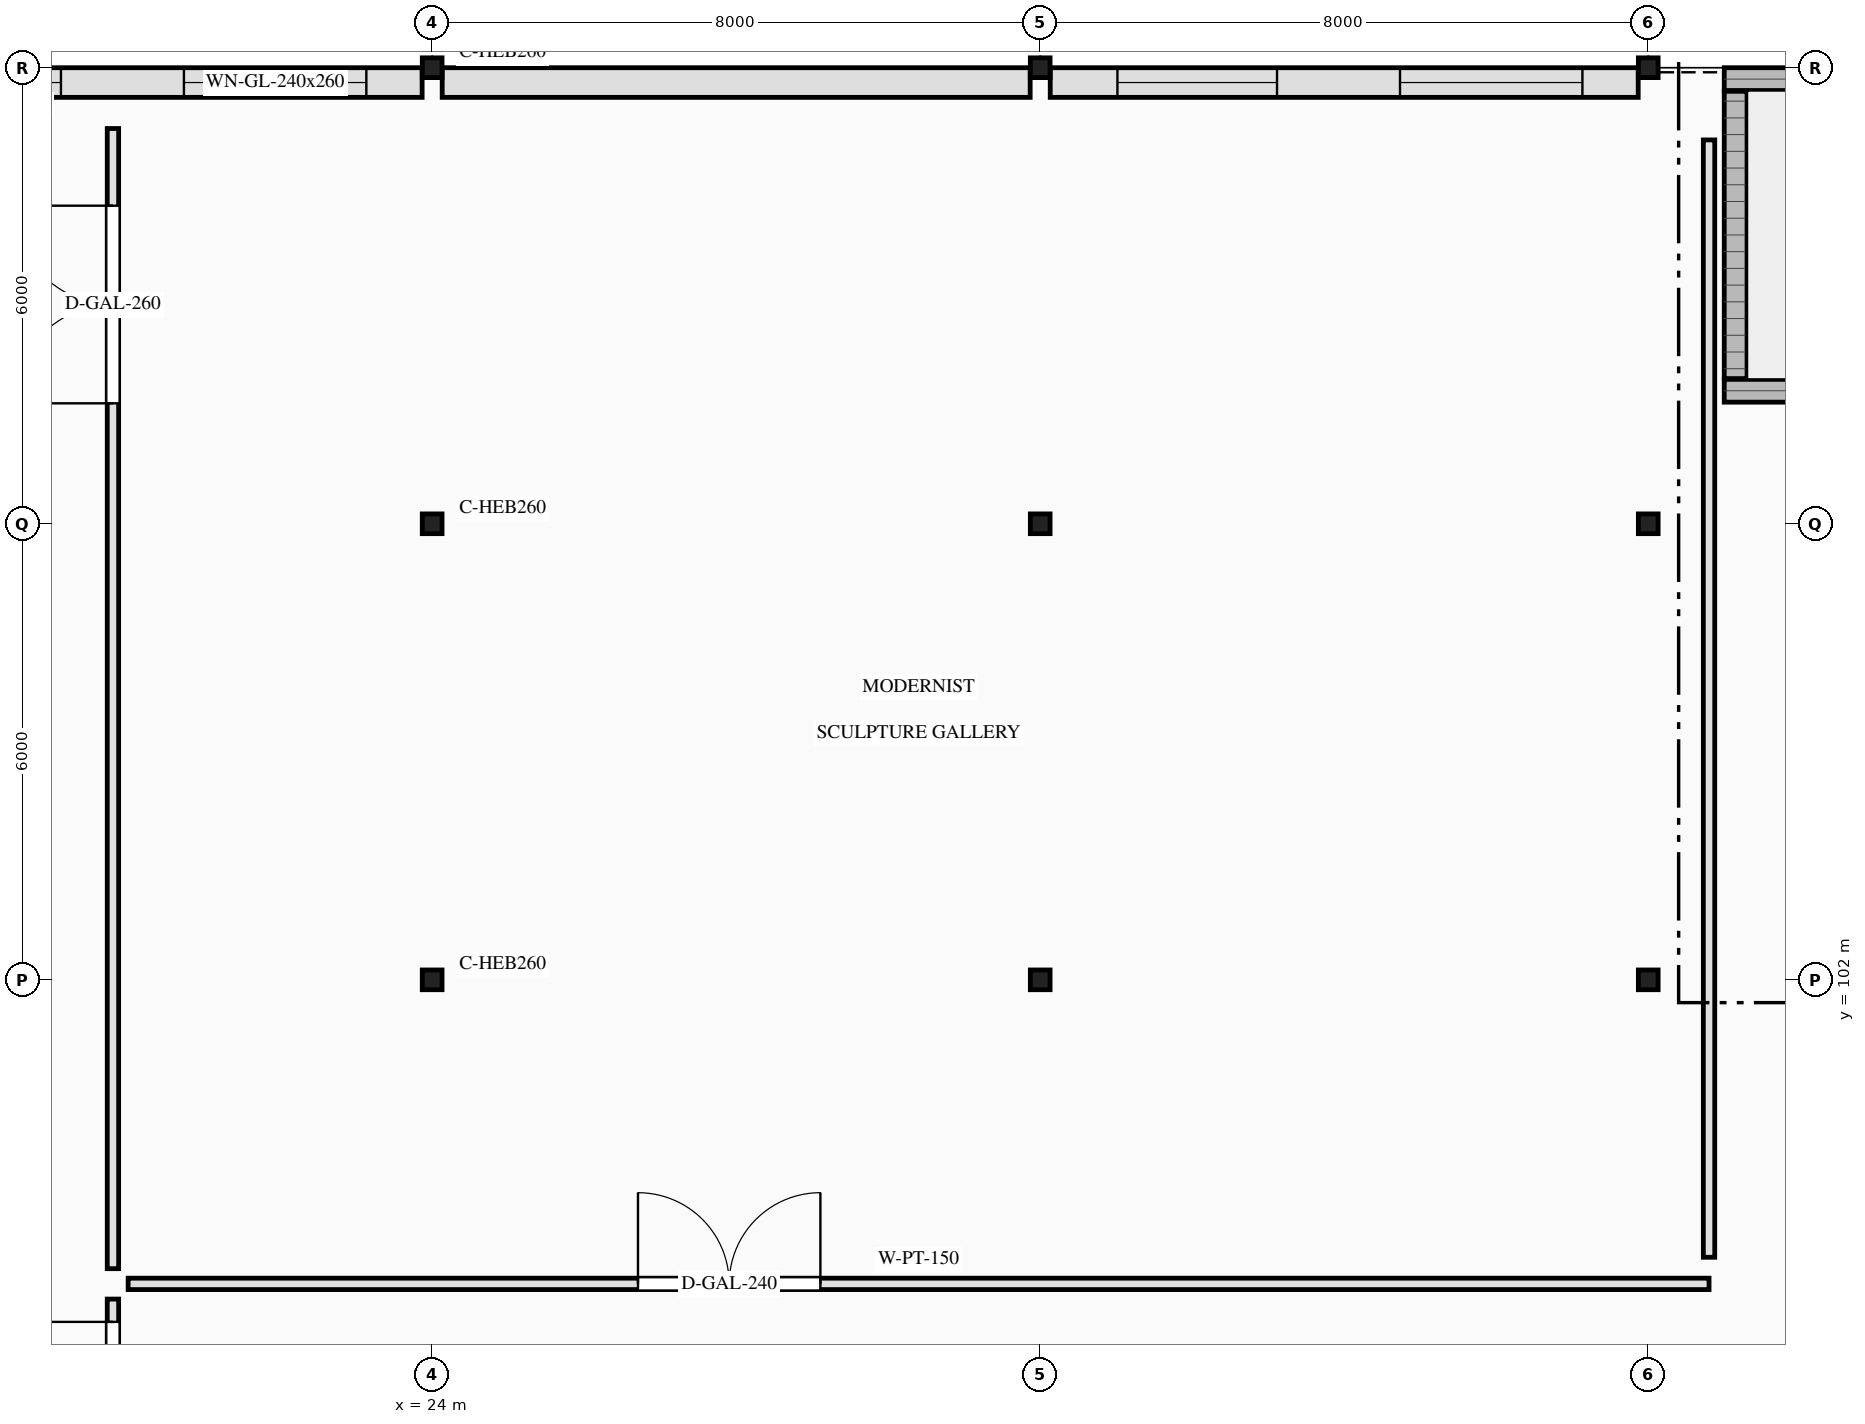
"""IFC4 building model, lengths in metres.
Left out: names, types, materials, properties, quantities, classifications, styles, units other than length and angle.
Written with IfcOpenShell. Run it as: python <this file> out.ifc"""

import sys

from ifc_helpers import new_model, si_unit, direction, frame, frame_2d, origin, origin_2d, place, context, subcontext, project, spatial, rectangle, i_section, extrude, element, fill, save


model = new_model("IFC4")
c1 = context("Model", 3, precision=1e-05, world=origin(), true_north=direction((0.0, 1.0)))
c2 = subcontext(c1, "Body", "Model", "MODEL_VIEW")
j1 = project(units=[si_unit("LENGTHUNIT", "METRE"), si_unit("PLANEANGLEUNIT", "RADIAN")], contexts=[c1])
p1 = place(None, origin())
s1 = spatial("IfcSite", under=j1, at=p1, CompositionType="ELEMENT")
p2 = place(p1, origin())
s2 = spatial("IfcBuilding", under=s1, at=p2, CompositionType="ELEMENT")
p3 = place(p2, frame((0.0, 0.0, 9.6)))
s3 = spatial("IfcBuildingStorey", under=s2, at=p3, CompositionType="ELEMENT", Elevation=9.6)
for number, where, z_axis, x_axis in (
    (1, (41.0, 109.75, 0.0), (0.0, 0.0, 1.0), (1.0, 0.0, 0.0)),
    (2, (41.0, 113.85, 0.0), (0.0, 0.0, 1.0), (1.0, 0.0, 0.0)),
):
    element("IfcWall", number, at=place(p3, frame(where, z_axis=z_axis, x_axis=x_axis)), inside=s3, PredefinedType="SHEAR", context=c2, shape_type="SweptSolid", body=[
        extrude(rectangle(XDim=10.0, YDim=0.3, at=frame_2d((5.0, 0.0))), origin(), (0.0, 0.0, 1.0), 8.0),
    ])
p4 = place(p3, frame((41.15, 109.91, 0.0), z_axis=(0.0, 0.0, 1.0), x_axis=(0.0, 1.0, 0.0)))
e3 = element("IfcWall", 3, at=p4, inside=s3, PredefinedType="SHEAR", context=c2, shape_type="SweptSolid", body=[
    extrude(rectangle(XDim=3.78, YDim=0.3, at=frame_2d((1.89, 0.0))), origin(), (0.0, 0.0, 1.0), 8.0),
])
for number, where, z_axis, x_axis in (
    (4, (24.0, 102.0, 0.0), (0.0, 0.0, 1.0), (1.0, 0.0, 0.0)),
    (5, (24.0, 108.0, 0.0), (0.0, 0.0, 1.0), (1.0, 0.0, 0.0)),
    (6, (24.0, 114.0, 0.0), (0.0, 0.0, 1.0), (1.0, 0.0, 0.0)),
    (7, (32.0, 102.0, 0.0), (0.0, 0.0, 1.0), (1.0, 0.0, 0.0)),
    (8, (32.0, 108.0, 0.0), (0.0, 0.0, 1.0), (1.0, 0.0, 0.0)),
    (9, (32.0, 114.0, 0.0), (0.0, 0.0, 1.0), (1.0, 0.0, 0.0)),
    (10, (40.0, 102.0, 0.0), (0.0, 0.0, 1.0), (1.0, 0.0, 0.0)),
    (11, (40.0, 108.0, 0.0), (0.0, 0.0, 1.0), (1.0, 0.0, 0.0)),
    (12, (40.0, 114.0, 0.0), (0.0, 0.0, 1.0), (1.0, 0.0, 0.0)),
):
    element("IfcColumn", number, at=place(p3, frame(where, z_axis=z_axis, x_axis=x_axis)), inside=s3, PredefinedType="COLUMN", context=c2, shape_type="SweptSolid", body=[
        extrude(i_section(OverallWidth=0.26, OverallDepth=0.26, WebThickness=0.01, FlangeThickness=0.018, FilletRadius=0.024, at=origin_2d()), origin(), (0.0, 0.0, 1.0), 8.0),
    ])
p5 = place(p3, frame((16.132, 113.805, 0.0), z_axis=(0.0, 0.0, 1.0), x_axis=(1.0, 0.0, 0.0)))
e13 = element("IfcWall", 13, at=p5, inside=s3, PredefinedType="SOLIDWALL", context=c2, shape_type="SweptSolid", body=[
    extrude(rectangle(XDim=7.736, YDim=0.39, at=frame_2d((3.868, 0.0))), origin(), (0.0, 0.0, 1.0), 7.305),
])
p6 = place(p5, frame((0.884, 0.0, 0.85)))
e14 = element("IfcOpeningElement", 14, at=p6, cuts=e13, PredefinedType="OPENING", context=c2, shape_type="SweptSolid", body=[
    extrude(rectangle(XDim=2.1, YDim=2.5, at=frame_2d((1.05, 1.25))), frame((0.0, 0.205, 0.0), z_axis=(0.0, -1.0, 0.0), x_axis=(1.0, 0.0, 0.0)), (0.0, 0.0, 1.0), 0.41),
])
p7 = place(p5, frame((4.602, 0.0, 0.85)))
e15 = element("IfcOpeningElement", 15, at=p7, cuts=e13, PredefinedType="OPENING", context=c2, shape_type="SweptSolid", body=[
    extrude(rectangle(XDim=2.4, YDim=2.6, at=frame_2d((1.2, 1.3))), frame((0.0, 0.205, 0.0), z_axis=(0.0, -1.0, 0.0), x_axis=(1.0, 0.0, 0.0)), (0.0, 0.0, 1.0), 0.41),
])
p8 = place(p3, frame((24.132, 113.805, 0.0), z_axis=(0.0, 0.0, 1.0), x_axis=(1.0, 0.0, 0.0)))
e16 = element("IfcWall", 16, at=p8, inside=s3, PredefinedType="SOLIDWALL", context=c2, shape_type="SweptSolid", body=[
    extrude(rectangle(XDim=7.736, YDim=0.39, at=frame_2d((3.868, 0.0))), origin(), (0.0, 0.0, 1.0), 7.305),
])
p9 = place(p3, frame((32.132, 113.805, 0.0), z_axis=(0.0, 0.0, 1.0), x_axis=(1.0, 0.0, 0.0)))
e17 = element("IfcWall", 17, at=p9, inside=s3, PredefinedType="SOLIDWALL", context=c2, shape_type="SweptSolid", body=[
    extrude(rectangle(XDim=7.736, YDim=0.39, at=frame_2d((3.868, 0.0))), origin(), (0.0, 0.0, 1.0), 7.305),
])
p10 = place(p9, frame((0.884, 0.0, 0.85)))
e18 = element("IfcOpeningElement", 18, at=p10, cuts=e17, PredefinedType="OPENING", context=c2, shape_type="SweptSolid", body=[
    extrude(rectangle(XDim=2.1, YDim=2.5, at=frame_2d((1.05, 1.25))), frame((0.0, 0.205, 0.0), z_axis=(0.0, -1.0, 0.0), x_axis=(1.0, 0.0, 0.0)), (0.0, 0.0, 1.0), 0.41),
])
p11 = place(p9, frame((4.602, 0.0, 0.85)))
e19 = element("IfcOpeningElement", 19, at=p11, cuts=e17, PredefinedType="OPENING", context=c2, shape_type="SweptSolid", body=[
    extrude(rectangle(XDim=2.4, YDim=2.6, at=frame_2d((1.2, 1.3))), frame((0.0, 0.205, 0.0), z_axis=(0.0, -1.0, 0.0), x_axis=(1.0, 0.0, 0.0)), (0.0, 0.0, 1.0), 0.41),
])
p12 = place(p3, frame((19.8, 94.2, 0.0), z_axis=(0.0, 0.0, 1.0), x_axis=(0.0, 1.0, 0.0)))
e20 = element("IfcWall", 20, at=p12, inside=s3, PredefinedType="PARTITIONING", context=c2, shape_type="SweptSolid", body=[
    extrude(rectangle(XDim=3.6, YDim=0.15, at=frame_2d((1.8, 0.0))), origin(), (0.0, 0.0, 1.0), 7.76),
])
p13 = place(p12, frame((0.7, 0.0, 0.0)))
e21 = element("IfcOpeningElement", 21, at=p13, cuts=e20, PredefinedType="OPENING", context=c2, shape_type="SweptSolid", body=[
    extrude(rectangle(XDim=2.6, YDim=2.9, at=frame_2d((1.3, 1.45))), frame((0.0, 0.085, 0.0), z_axis=(0.0, -1.0, 0.0), x_axis=(1.0, 0.0, 0.0)), (0.0, 0.0, 1.0), 0.17),
])
p14 = place(p3, frame((20.0, 98.0, 0.0), z_axis=(0.0, 0.0, 1.0), x_axis=(1.0, 0.0, 0.0)))
e22 = element("IfcWall", 22, at=p14, inside=s3, PredefinedType="PARTITIONING", context=c2, shape_type="SweptSolid", body=[
    extrude(rectangle(XDim=20.8, YDim=0.15, at=frame_2d((10.4, 0.0))), origin(), (0.0, 0.0, 1.0), 7.76),
])
p15 = place(p14, frame((6.708, 0.0, 0.0)))
e23 = element("IfcOpeningElement", 23, at=p15, cuts=e22, PredefinedType="OPENING", context=c2, shape_type="SweptSolid", body=[
    extrude(rectangle(XDim=2.4, YDim=2.75, at=frame_2d((1.2, 1.375))), frame((0.0, 0.085, 0.0), z_axis=(0.0, -1.0, 0.0), x_axis=(1.0, 0.0, 0.0)), (0.0, 0.0, 1.0), 0.17),
])
p16 = place(p3, frame((19.8, 98.2, 0.0), z_axis=(0.0, 0.0, 1.0), x_axis=(0.0, 1.0, 0.0)))
e24 = element("IfcWall", 24, at=p16, inside=s3, PredefinedType="PARTITIONING", context=c2, shape_type="SweptSolid", body=[
    extrude(rectangle(XDim=15.0, YDim=0.15, at=frame_2d((7.5, 0.0))), origin(), (0.0, 0.0, 1.0), 7.76),
])
p17 = place(p16, frame((11.385, 0.0, 0.0)))
e25 = element("IfcOpeningElement", 25, at=p17, cuts=e24, PredefinedType="OPENING", context=c2, shape_type="SweptSolid", body=[
    extrude(rectangle(XDim=2.6, YDim=2.9, at=frame_2d((1.3, 1.45))), frame((0.0, 0.085, 0.0), z_axis=(0.0, -1.0, 0.0), x_axis=(1.0, 0.0, 0.0)), (0.0, 0.0, 1.0), 0.17),
])
p18 = place(p3, frame((40.8, 98.35, 0.0), z_axis=(0.0, 0.0, 1.0), x_axis=(0.0, 1.0, 0.0)))
e26 = element("IfcWall", 26, at=p18, inside=s3, PredefinedType="PARTITIONING", context=c2, shape_type="SweptSolid", body=[
    extrude(rectangle(XDim=14.7, YDim=0.15, at=frame_2d((7.35, 0.0))), origin(), (0.0, 0.0, 1.0), 7.76),
])
p19 = place(p6, origin())
e27 = element("IfcWindow", 27, at=p19, inside=s3, PartitioningType="DOUBLE_PANEL_VERTICAL", PredefinedType="WINDOW", context=c2, shape_type="SweptSolid", body=[
    extrude(rectangle(XDim=2.1, YDim=2.5, at=frame_2d((1.05, 1.25))), frame((0.0, 0.03, 0.0), z_axis=(0.0, -1.0, 0.0), x_axis=(1.0, 0.0, 0.0)), (0.0, 0.0, 1.0), 0.06),
])
fill(e14, e27)
p20 = place(p7, origin())
e28 = element("IfcWindow", 28, at=p20, inside=s3, PartitioningType="TRIPLE_PANEL_VERTICAL", PredefinedType="WINDOW", context=c2, shape_type="SweptSolid", body=[
    extrude(rectangle(XDim=2.4, YDim=2.6, at=frame_2d((1.2, 1.3))), frame((0.0, 0.03, 0.0), z_axis=(0.0, -1.0, 0.0), x_axis=(1.0, 0.0, 0.0)), (0.0, 0.0, 1.0), 0.06),
])
fill(e15, e28)
p21 = place(p10, origin())
e29 = element("IfcWindow", 29, at=p21, inside=s3, PartitioningType="DOUBLE_PANEL_VERTICAL", PredefinedType="WINDOW", context=c2, shape_type="SweptSolid", body=[
    extrude(rectangle(XDim=2.1, YDim=2.5, at=frame_2d((1.05, 1.25))), frame((0.0, 0.03, 0.0), z_axis=(0.0, -1.0, 0.0), x_axis=(1.0, 0.0, 0.0)), (0.0, 0.0, 1.0), 0.06),
])
fill(e18, e29)
p22 = place(p11, origin())
e30 = element("IfcWindow", 30, at=p22, inside=s3, PartitioningType="TRIPLE_PANEL_VERTICAL", PredefinedType="WINDOW", context=c2, shape_type="SweptSolid", body=[
    extrude(rectangle(XDim=2.4, YDim=2.6, at=frame_2d((1.2, 1.3))), frame((0.0, 0.03, 0.0), z_axis=(0.0, -1.0, 0.0), x_axis=(1.0, 0.0, 0.0)), (0.0, 0.0, 1.0), 0.06),
])
fill(e19, e30)
p23 = place(p13, origin())
e31 = element("IfcDoor", 31, at=p23, inside=s3, OperationType="DOUBLE_DOOR_DOUBLE_SWING", PredefinedType="DOOR", context=c2, shape_type="SweptSolid", body=[
    extrude(rectangle(XDim=2.6, YDim=2.9, at=frame_2d((1.3, 1.45))), frame((0.0, 0.025, 0.0), z_axis=(0.0, -1.0, 0.0), x_axis=(1.0, 0.0, 0.0)), (0.0, 0.0, 1.0), 0.05),
])
fill(e21, e31)
p24 = place(p15, origin())
e32 = element("IfcDoor", 32, at=p24, inside=s3, OperationType="DOUBLE_DOOR_DOUBLE_SWING", PredefinedType="DOOR", context=c2, shape_type="SweptSolid", body=[
    extrude(rectangle(XDim=2.4, YDim=2.75, at=frame_2d((1.2, 1.375))), frame((0.0, 0.025, 0.0), z_axis=(0.0, -1.0, 0.0), x_axis=(1.0, 0.0, 0.0)), (0.0, 0.0, 1.0), 0.05),
])
fill(e23, e32)
p25 = place(p17, origin())
e33 = element("IfcDoor", 33, at=p25, inside=s3, OperationType="DOUBLE_DOOR_DOUBLE_SWING", PredefinedType="DOOR", context=c2, shape_type="SweptSolid", body=[
    extrude(rectangle(XDim=2.6, YDim=2.9, at=frame_2d((1.3, 1.45))), frame((0.0, 0.025, 0.0), z_axis=(0.0, -1.0, 0.0), x_axis=(1.0, 0.0, 0.0)), (0.0, 0.0, 1.0), 0.05),
])
fill(e25, e33)
save(model, sys.argv[1])
